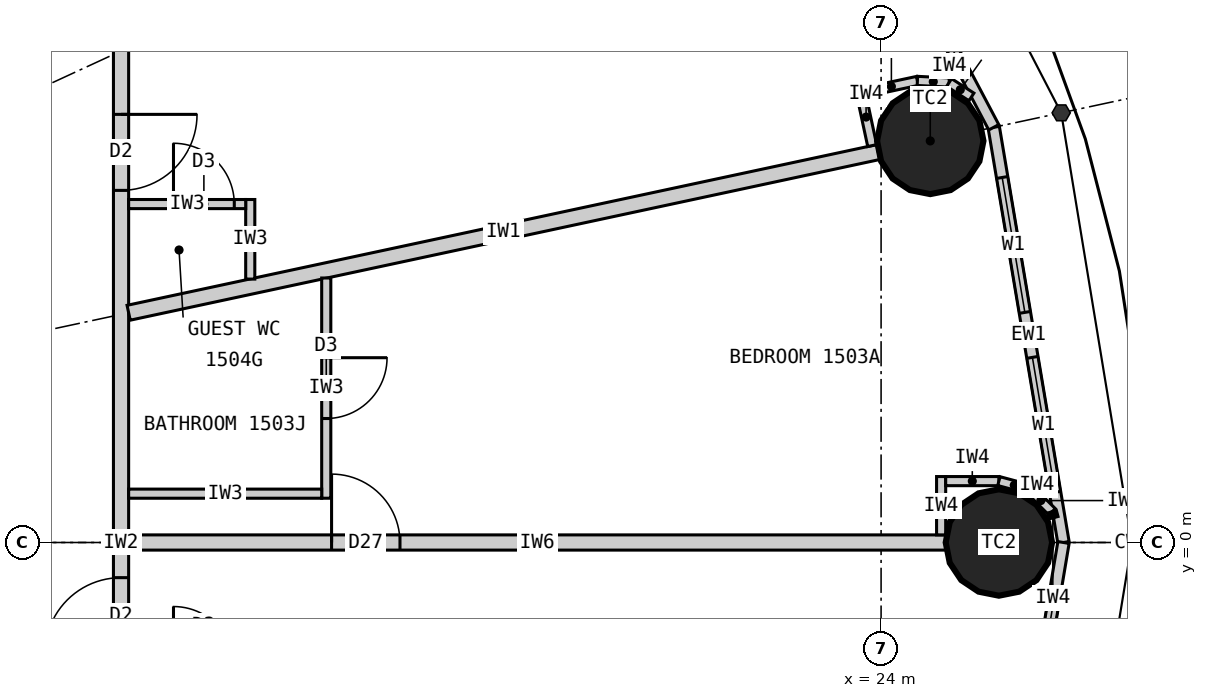
"""IFC4 building model, lengths in metres.
Left out: names, types, materials, properties, quantities, classifications, styles, units other than length and angle.
Written with IfcOpenShell. Run it as: python <this file> out.ifc"""

import sys

from ifc_helpers import new_model, si_unit, direction, frame, frame_2d, origin, origin_2d, place, context, subcontext, project, spatial, rectangle, circle, extrude, element, fill, save


model = new_model("IFC4")
c1 = context("Model", 3, precision=1e-05, world=origin(), true_north=direction((0.0, 1.0)))
c2 = subcontext(c1, "Body", "Model", "MODEL_VIEW")
j1 = project(units=[si_unit("LENGTHUNIT", "METRE"), si_unit("PLANEANGLEUNIT", "RADIAN")], contexts=[c1])
p1 = place(None, origin())
s1 = spatial("IfcSite", under=j1, at=p1, CompositionType="ELEMENT")
p2 = place(p1, origin())
s2 = spatial("IfcBuilding", under=s1, at=p2, CompositionType="ELEMENT")
p3 = place(p2, frame((0.0, 0.0, 63.9)))
s3 = spatial("IfcBuildingStorey", under=s2, at=p3, CompositionType="ELEMENT", Elevation=63.9)
for number, where, z_axis, x_axis in (
    (1, (25.55, 0.0, 0.0), (0.0, 0.0, 1.0), (1.0, 0.0, 0.0)),
    (2, (24.647, 5.283, 0.0), (0.0, 0.0, 1.0), (1.0, 0.0, 0.0)),
):
    element("IfcColumn", number, at=place(p3, frame(where, z_axis=z_axis, x_axis=x_axis)), inside=s3, PredefinedType="COLUMN", context=c2, shape_type="SweptSolid", body=[
        extrude(circle(Radius=0.7, at=origin_2d()), origin(), (0.0, 0.0, 1.0), 3.3),
    ])
p4 = place(p3, frame((26.4, 0.0, 0.0), z_axis=(0.0, 0.0, 1.0), x_axis=(-0.165642551694, 0.986185857264, 0.0)))
e3 = element("IfcWall", 3, at=p4, inside=s3, PredefinedType="ELEMENTEDWALL", context=c2, shape_type="SweptSolid", body=[
    extrude(rectangle(XDim=5.539, YDim=0.15, at=frame_2d((2.77, 0.0))), origin(), (0.0, 0.0, 1.0), 3.12),
])
p5 = place(p4, frame((0.669, 0.0, 0.9)))
e4 = element("IfcOpeningElement", 4, at=p5, cuts=e3, PredefinedType="OPENING", context=c2, shape_type="SweptSolid", body=[
    extrude(rectangle(XDim=1.8, YDim=1.9, at=frame_2d((0.9, 0.95))), frame((0.0, 0.085, 0.0), z_axis=(0.0, -1.0, 0.0), x_axis=(1.0, 0.0, 0.0)), (0.0, 0.0, 1.0), 0.17),
])
p6 = place(p4, frame((3.07, 0.0, 0.9)))
e5 = element("IfcOpeningElement", 5, at=p6, cuts=e3, PredefinedType="OPENING", context=c2, shape_type="SweptSolid", body=[
    extrude(rectangle(XDim=1.8, YDim=1.9, at=frame_2d((0.9, 0.95))), frame((0.0, 0.085, 0.0), z_axis=(0.0, -1.0, 0.0), x_axis=(1.0, 0.0, 0.0)), (0.0, 0.0, 1.0), 0.17),
])
p7 = place(p3, frame((25.482, 5.462, 0.0), z_axis=(0.0, 0.0, 1.0), x_axis=(-0.467296867008, 0.884100468321, 0.0)))
e6 = element("IfcWall", 6, at=p7, inside=s3, PredefinedType="ELEMENTEDWALL", context=c2, shape_type="SweptSolid", body=[
    extrude(rectangle(XDim=5.734, YDim=0.15, at=frame_2d((2.867, 0.0))), origin(), (0.0, 0.0, 1.0), 3.12),
])
p8 = place(p7, frame((0.767, 0.0, 0.9)))
e7 = element("IfcOpeningElement", 7, at=p8, cuts=e6, PredefinedType="OPENING", context=c2, shape_type="SweptSolid", body=[
    extrude(rectangle(XDim=1.8, YDim=1.9, at=frame_2d((0.9, 0.95))), frame((0.0, 0.085, 0.0), z_axis=(0.0, -1.0, 0.0), x_axis=(1.0, 0.0, 0.0)), (0.0, 0.0, 1.0), 0.17),
])
p9 = place(p7, frame((3.167, 0.0, 0.9)))
e8 = element("IfcOpeningElement", 8, at=p9, cuts=e6, PredefinedType="OPENING", context=c2, shape_type="SweptSolid", body=[
    extrude(rectangle(XDim=1.8, YDim=1.9, at=frame_2d((0.9, 0.95))), frame((0.0, 0.085, 0.0), z_axis=(0.0, -1.0, 0.0), x_axis=(1.0, 0.0, 0.0)), (0.0, 0.0, 1.0), 0.17),
])
p10 = place(p3, frame((25.482, -5.462, 0.0), z_axis=(0.0, 0.0, 1.0), x_axis=(0.165642551694, 0.986185857264, 0.0)))
e9 = element("IfcWall", 9, at=p10, inside=s3, PredefinedType="ELEMENTEDWALL", context=c2, shape_type="SweptSolid", body=[
    extrude(rectangle(XDim=5.539, YDim=0.15, at=frame_2d((2.77, 0.0))), origin(), (0.0, 0.0, 1.0), 3.12),
])
p11 = place(p10, frame((0.669, 0.0, 0.9)))
e10 = element("IfcOpeningElement", 10, at=p11, cuts=e9, PredefinedType="OPENING", context=c2, shape_type="SweptSolid", body=[
    extrude(rectangle(XDim=1.8, YDim=1.9, at=frame_2d((0.9, 0.95))), frame((0.0, 0.085, 0.0), z_axis=(0.0, -1.0, 0.0), x_axis=(1.0, 0.0, 0.0)), (0.0, 0.0, 1.0), 0.17),
])
p12 = place(p10, frame((3.07, 0.0, 0.9)))
e11 = element("IfcOpeningElement", 11, at=p12, cuts=e9, PredefinedType="OPENING", context=c2, shape_type="SweptSolid", body=[
    extrude(rectangle(XDim=1.8, YDim=1.9, at=frame_2d((0.9, 0.95))), frame((0.0, 0.085, 0.0), z_axis=(0.0, -1.0, 0.0), x_axis=(1.0, 0.0, 0.0)), (0.0, 0.0, 1.0), 0.17),
])
p13 = place(p3, frame((14.0, -9.9, 0.0), z_axis=(0.0, 0.0, 1.0), x_axis=(0.0, 1.0, 0.0)))
e12 = element("IfcWall", 12, at=p13, inside=s3, PredefinedType="PARTITIONING", context=c2, shape_type="SweptSolid", body=[
    extrude(rectangle(XDim=19.8, YDim=0.2, at=frame_2d((9.9, 0.0))), origin(), (0.0, 0.0, 1.0), 3.12),
])
p14 = place(p13, frame((0.103, 0.0, 0.0)))
e13 = element("IfcOpeningElement", 13, at=p14, cuts=e12, PredefinedType="OPENING", context=c2, shape_type="SweptSolid", body=[
    extrude(rectangle(XDim=1.0, YDim=2.2, at=frame_2d((0.5, 1.1))), frame((0.0, 0.11, 0.0), z_axis=(0.0, -1.0, 0.0), x_axis=(1.0, 0.0, 0.0)), (0.0, 0.0, 1.0), 0.22),
])
p15 = place(p13, frame((5.248, 0.0, 0.0)))
e14 = element("IfcOpeningElement", 14, at=p15, cuts=e12, PredefinedType="OPENING", context=c2, shape_type="SweptSolid", body=[
    extrude(rectangle(XDim=1.0, YDim=2.2, at=frame_2d((0.5, 1.1))), frame((0.0, 0.11, 0.0), z_axis=(0.0, -1.0, 0.0), x_axis=(1.0, 0.0, 0.0)), (0.0, 0.0, 1.0), 0.22),
])
p16 = place(p13, frame((8.438, 0.0, 0.0)))
e15 = element("IfcOpeningElement", 15, at=p16, cuts=e12, PredefinedType="OPENING", context=c2, shape_type="SweptSolid", body=[
    extrude(rectangle(XDim=1.0, YDim=2.2, at=frame_2d((0.5, 1.1))), frame((0.0, 0.11, 0.0), z_axis=(0.0, -1.0, 0.0), x_axis=(1.0, 0.0, 0.0)), (0.0, 0.0, 1.0), 0.22),
])
p17 = place(p13, frame((14.532, 0.0, 0.0)))
e16 = element("IfcOpeningElement", 16, at=p17, cuts=e12, PredefinedType="OPENING", context=c2, shape_type="SweptSolid", body=[
    extrude(rectangle(XDim=1.0, YDim=2.2, at=frame_2d((0.5, 1.1))), frame((0.0, 0.11, 0.0), z_axis=(0.0, -1.0, 0.0), x_axis=(1.0, 0.0, 0.0)), (0.0, 0.0, 1.0), 0.22),
])
p18 = place(p3, frame((14.1, 0.0, 0.0), z_axis=(0.0, 0.0, 1.0), x_axis=(1.0, 0.0, 0.0)))
e17 = element("IfcWall", 17, at=p18, inside=s3, PredefinedType="PARTITIONING", context=c2, shape_type="SweptSolid", body=[
    extrude(rectangle(XDim=10.75, YDim=0.2, at=frame_2d((5.375, 0.0))), origin(), (0.0, 0.0, 1.0), 2.27),
])
p19 = place(p18, frame((2.67, 0.0, 0.0)))
e18 = element("IfcOpeningElement", 18, at=p19, cuts=e17, PredefinedType="OPENING", context=c2, shape_type="SweptSolid", body=[
    extrude(rectangle(XDim=0.9, YDim=2.1, at=frame_2d((0.45, 1.05))), frame((0.0, 0.11, 0.0), z_axis=(0.0, -1.0, 0.0), x_axis=(1.0, 0.0, 0.0)), (0.0, 0.0, 1.0), 0.22),
])
p20 = place(p3, frame((14.1, 3.022, 0.0), z_axis=(0.0, 0.0, 1.0), x_axis=(0.977790014929, 0.209586943072, 0.0)))
e19 = element("IfcWall", 19, at=p20, inside=s3, PredefinedType="PARTITIONING", context=c2, shape_type="SweptSolid", body=[
    extrude(rectangle(XDim=10.087, YDim=0.2, at=frame_2d((5.043, 0.0))), origin(), (0.0, 0.0, 1.0), 2.32),
])
p21 = place(p3, frame((16.7, 3.48, 0.0), z_axis=(0.0, 0.0, 1.0), x_axis=(0.0, -1.0, 0.0)))
e20 = element("IfcWall", 20, at=p21, inside=s3, PredefinedType="PARTITIONING", context=c2, shape_type="SweptSolid", body=[
    extrude(rectangle(XDim=2.897, YDim=0.12, at=frame_2d((1.449, 0.0))), origin(), (0.0, 0.0, 1.0), 3.12),
])
p22 = place(p21, frame((1.049, 0.0, 0.0)))
e21 = element("IfcOpeningElement", 21, at=p22, cuts=e20, PredefinedType="OPENING", context=c2, shape_type="SweptSolid", body=[
    extrude(rectangle(XDim=0.8, YDim=2.1, at=frame_2d((0.4, 1.05))), frame((0.0, 0.07, 0.0), z_axis=(0.0, -1.0, 0.0), x_axis=(1.0, 0.0, 0.0)), (0.0, 0.0, 1.0), 0.14),
])
p23 = place(p3, frame((14.1, 0.643, 0.0), z_axis=(0.0, 0.0, 1.0), x_axis=(1.0, 0.0, 0.0)))
e22 = element("IfcWall", 22, at=p23, inside=s3, PredefinedType="PARTITIONING", context=c2, shape_type="SweptSolid", body=[
    extrude(rectangle(XDim=2.54, YDim=0.12, at=frame_2d((1.27, 0.0))), origin(), (0.0, 0.0, 1.0), 3.12),
])
p24 = place(p3, frame((15.7, 3.465, 0.0), z_axis=(0.0, 0.0, 1.0), x_axis=(0.0, 1.0, 0.0)))
e23 = element("IfcWall", 23, at=p24, inside=s3, PredefinedType="PARTITIONING", context=c2, shape_type="SweptSolid", body=[
    extrude(rectangle(XDim=1.047, YDim=0.12, at=frame_2d((0.523, 0.0))), origin(), (0.0, 0.0, 1.0), 3.12),
])
p25 = place(p3, frame((14.1, 4.452, 0.0), z_axis=(0.0, 0.0, 1.0), x_axis=(1.0, 0.0, 0.0)))
e24 = element("IfcWall", 24, at=p25, inside=s3, PredefinedType="PARTITIONING", context=c2, shape_type="SweptSolid", body=[
    extrude(rectangle(XDim=1.54, YDim=0.12, at=frame_2d((0.77, 0.0))), origin(), (0.0, 0.0, 1.0), 3.12),
])
p26 = place(p25, frame((0.59, 0.0, 0.0)))
e25 = element("IfcOpeningElement", 25, at=p26, cuts=e24, PredefinedType="OPENING", context=c2, shape_type="SweptSolid", body=[
    extrude(rectangle(XDim=0.8, YDim=2.1, at=frame_2d((0.4, 1.05))), frame((0.0, 0.07, 0.0), z_axis=(0.0, -1.0, 0.0), x_axis=(1.0, 0.0, 0.0)), (0.0, 0.0, 1.0), 0.14),
])
p27 = place(p3, frame((24.79, 0.1, 0.0), z_axis=(0.0, 0.0, 1.0), x_axis=(0.0, 1.0, 0.0)))
e26 = element("IfcWall", 26, at=p27, inside=s3, PredefinedType="PARTITIONING", context=c2, shape_type="SweptSolid", body=[
    extrude(rectangle(XDim=0.767, YDim=0.12, at=frame_2d((0.384, 0.0))), origin(), (0.0, 0.0, 1.0), 3.12),
])
p28 = place(p3, frame((24.85, 0.808, 0.0), z_axis=(0.0, 0.0, 1.0), x_axis=(1.0, 0.0, 0.0)))
e27 = element("IfcWall", 27, at=p28, inside=s3, PredefinedType="PARTITIONING", context=c2, shape_type="SweptSolid", body=[
    extrude(rectangle(XDim=0.7, YDim=0.12, at=frame_2d((0.35, 0.0))), origin(), (0.0, 0.0, 1.0), 3.12),
])
p29 = place(p3, frame((25.55, 0.808, 0.0), z_axis=(0.0, 0.0, 1.0), x_axis=(0.965807183573, -0.2592614205, 0.0)))
e28 = element("IfcWall", 28, at=p29, inside=s3, PredefinedType="PARTITIONING", context=c2, shape_type="SweptSolid", body=[
    extrude(rectangle(XDim=0.418, YDim=0.12, at=frame_2d((0.209, 0.0))), origin(), (0.0, 0.0, 1.0), 3.12),
])
p30 = place(p3, frame((25.954, 0.699, 0.0), z_axis=(0.0, 0.0, 1.0), x_axis=(0.707106781187, -0.707106781187, 0.0)))
e29 = element("IfcWall", 29, at=p30, inside=s3, PredefinedType="PARTITIONING", context=c2, shape_type="SweptSolid", body=[
    extrude(rectangle(XDim=0.418, YDim=0.12, at=frame_2d((0.209, 0.0))), origin(), (0.0, 0.0, 1.0), 3.12),
])
p31 = place(p3, frame((26.249, 0.404, 0.0), z_axis=(0.0, 0.0, 1.0), x_axis=(0.259754282609, -0.965674744759, 0.0)))
e30 = element("IfcWall", 30, at=p31, inside=s3, PredefinedType="PARTITIONING", context=c2, shape_type="SweptSolid", body=[
    extrude(rectangle(XDim=0.08, YDim=0.12, at=frame_2d((0.04, 0.0))), origin(), (0.0, 0.0, 1.0), 3.12),
])
p32 = place(p3, frame((23.883, 5.222, 0.0), z_axis=(0.0, 0.0, 1.0), x_axis=(-0.209311842415, 0.977848941619, 0.0)))
e31 = element("IfcWall", 31, at=p32, inside=s3, PredefinedType="PARTITIONING", context=c2, shape_type="SweptSolid", body=[
    extrude(rectangle(XDim=0.768, YDim=0.12, at=frame_2d((0.384, 0.0))), origin(), (0.0, 0.0, 1.0), 3.12),
])
p33 = place(p3, frame((23.793, 5.926, 0.0), z_axis=(0.0, 0.0, 1.0), x_axis=(0.977792206673, 0.209576717621, 0.0)))
e32 = element("IfcWall", 32, at=p33, inside=s3, PredefinedType="PARTITIONING", context=c2, shape_type="SweptSolid", body=[
    extrude(rectangle(XDim=0.7, YDim=0.12, at=frame_2d((0.35, 0.0))), origin(), (0.0, 0.0, 1.0), 3.12),
])
p34 = place(p3, frame((24.478, 6.073, 0.0), z_axis=(0.0, 0.0, 1.0), x_axis=(0.998708262812, -0.05081147302, 0.0)))
e33 = element("IfcWall", 33, at=p34, inside=s3, PredefinedType="PARTITIONING", context=c2, shape_type="SweptSolid", body=[
    extrude(rectangle(XDim=0.418, YDim=0.12, at=frame_2d((0.209, 0.0))), origin(), (0.0, 0.0, 1.0), 3.12),
])
p35 = place(p3, frame((24.895, 6.052, 0.0), z_axis=(0.0, 0.0, 1.0), x_axis=(0.839495197275, -0.54336710772, 0.0)))
e34 = element("IfcWall", 34, at=p35, inside=s3, PredefinedType="PARTITIONING", context=c2, shape_type="SweptSolid", body=[
    extrude(rectangle(XDim=0.35, YDim=0.12, at=frame_2d((0.175, 0.0))), origin(), (0.0, 0.0, 1.0), 3.12),
])
p36 = place(p5, origin())
e35 = element("IfcWindow", 35, at=p36, inside=s3, PartitioningType="SINGLE_PANEL", PredefinedType="WINDOW", context=c2, shape_type="SweptSolid", body=[
    extrude(rectangle(XDim=1.8, YDim=1.9, at=frame_2d((0.9, 0.95))), frame((0.0, 0.03, 0.0), z_axis=(0.0, -1.0, 0.0), x_axis=(1.0, 0.0, 0.0)), (0.0, 0.0, 1.0), 0.06),
])
fill(e4, e35)
p37 = place(p6, origin())
e36 = element("IfcWindow", 36, at=p37, inside=s3, PartitioningType="SINGLE_PANEL", PredefinedType="WINDOW", context=c2, shape_type="SweptSolid", body=[
    extrude(rectangle(XDim=1.8, YDim=1.9, at=frame_2d((0.9, 0.95))), frame((0.0, 0.03, 0.0), z_axis=(0.0, -1.0, 0.0), x_axis=(1.0, 0.0, 0.0)), (0.0, 0.0, 1.0), 0.06),
])
fill(e5, e36)
p38 = place(p8, origin())
e37 = element("IfcWindow", 37, at=p38, inside=s3, PartitioningType="SINGLE_PANEL", PredefinedType="WINDOW", context=c2, shape_type="SweptSolid", body=[
    extrude(rectangle(XDim=1.8, YDim=1.9, at=frame_2d((0.9, 0.95))), frame((0.0, 0.03, 0.0), z_axis=(0.0, -1.0, 0.0), x_axis=(1.0, 0.0, 0.0)), (0.0, 0.0, 1.0), 0.06),
])
fill(e7, e37)
p39 = place(p12, origin())
e38 = element("IfcWindow", 38, at=p39, inside=s3, PartitioningType="SINGLE_PANEL", PredefinedType="WINDOW", context=c2, shape_type="SweptSolid", body=[
    extrude(rectangle(XDim=1.8, YDim=1.9, at=frame_2d((0.9, 0.95))), frame((0.0, 0.03, 0.0), z_axis=(0.0, -1.0, 0.0), x_axis=(1.0, 0.0, 0.0)), (0.0, 0.0, 1.0), 0.06),
])
fill(e11, e38)
p40 = place(p16, origin())
e39 = element("IfcDoor", 39, at=p40, inside=s3, OperationType="SINGLE_SWING_LEFT", PredefinedType="DOOR", context=c2, shape_type="SweptSolid", body=[
    extrude(rectangle(XDim=1.0, YDim=2.2, at=frame_2d((0.5, 1.1))), frame((0.0, 0.025, 0.0), z_axis=(0.0, -1.0, 0.0), x_axis=(1.0, 0.0, 0.0)), (0.0, 0.0, 1.0), 0.05),
])
fill(e15, e39)
p41 = place(p22, origin())
e40 = element("IfcDoor", 40, at=p41, inside=s3, OperationType="SINGLE_SWING_LEFT", PredefinedType="DOOR", context=c2, shape_type="SweptSolid", body=[
    extrude(rectangle(XDim=0.8, YDim=2.1, at=frame_2d((0.4, 1.05))), frame((0.0, 0.025, 0.0), z_axis=(0.0, -1.0, 0.0), x_axis=(1.0, 0.0, 0.0)), (0.0, 0.0, 1.0), 0.05),
])
fill(e21, e40)
p42 = place(p19, origin())
e41 = element("IfcDoor", 41, at=p42, inside=s3, OperationType="SINGLE_SWING_LEFT", PredefinedType="DOOR", context=c2, shape_type="SweptSolid", body=[
    extrude(rectangle(XDim=0.9, YDim=2.1, at=frame_2d((0.45, 1.05))), frame((0.0, 0.025, 0.0), z_axis=(0.0, -1.0, 0.0), x_axis=(1.0, 0.0, 0.0)), (0.0, 0.0, 1.0), 0.05),
])
fill(e18, e41)
p43 = place(p26, origin())
e42 = element("IfcDoor", 42, at=p43, inside=s3, OperationType="SINGLE_SWING_LEFT", PredefinedType="DOOR", context=c2, shape_type="SweptSolid", body=[
    extrude(rectangle(XDim=0.8, YDim=2.1, at=frame_2d((0.4, 1.05))), frame((0.0, 0.025, 0.0), z_axis=(0.0, -1.0, 0.0), x_axis=(1.0, 0.0, 0.0)), (0.0, 0.0, 1.0), 0.05),
])
fill(e25, e42)
p44 = place(p17, origin())
e43 = element("IfcDoor", 43, at=p44, inside=s3, OperationType="SINGLE_SWING_RIGHT", PredefinedType="DOOR", context=c2, shape_type="SweptSolid", body=[
    extrude(rectangle(XDim=1.0, YDim=2.2, at=frame_2d((0.5, 1.1))), frame((0.0, 0.025, 0.0), z_axis=(0.0, -1.0, 0.0), x_axis=(1.0, 0.0, 0.0)), (0.0, 0.0, 1.0), 0.05),
])
fill(e16, e43)
save(model, sys.argv[1])
